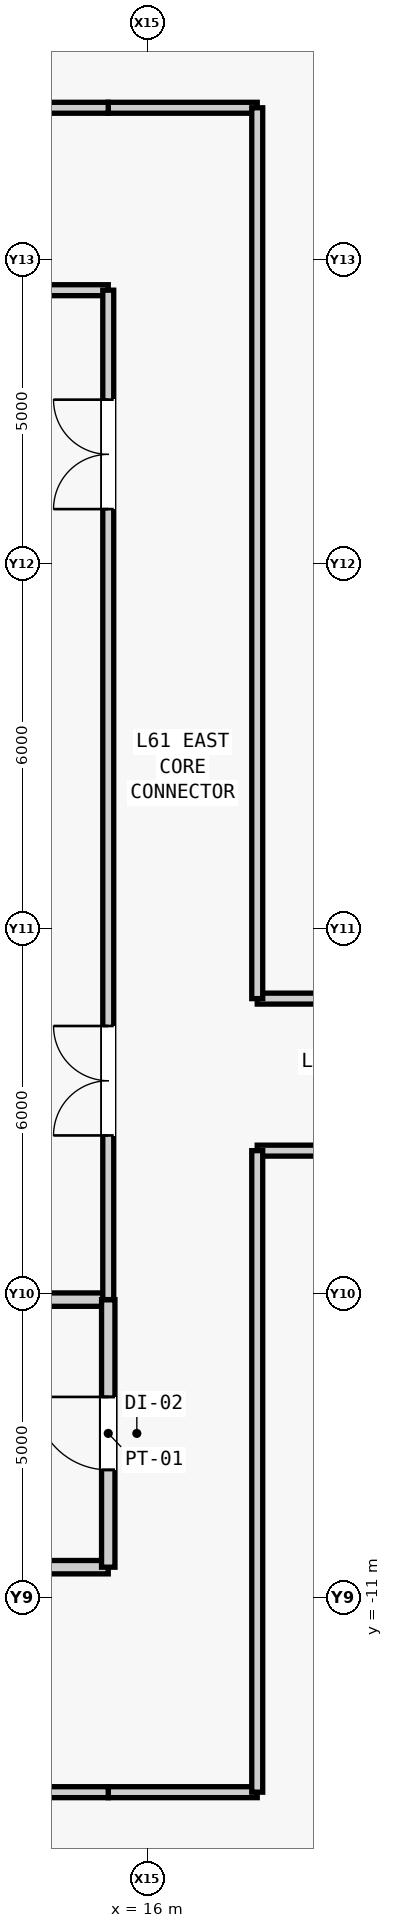
"""IFC4 building model, lengths in metres.
Left out: names, types, materials, properties, quantities, classifications, styles, units other than length and angle.
Written with IfcOpenShell. Run it as: python <this file> out.ifc"""

import sys

from ifc_helpers import new_model, si_unit, direction, frame, frame_2d, origin, place, context, subcontext, project, spatial, rectangle, extrude, source, transform, mapped, element, fill, save


model = new_model("IFC4")
c1 = context("Model", 3, precision=1e-05, world=origin(), true_north=direction((0.0, 1.0)))
c2 = subcontext(c1, "Body", "Model", "MODEL_VIEW")
j1 = project(units=[si_unit("LENGTHUNIT", "METRE"), si_unit("PLANEANGLEUNIT", "RADIAN")], contexts=[c1])
p1 = place(None, origin())
s1 = spatial("IfcSite", under=j1, at=p1, CompositionType="ELEMENT")
p2 = place(p1, origin())
s2 = spatial("IfcBuilding", under=s1, at=p2, CompositionType="ELEMENT")
p3 = place(p2, frame((0.0, 0.0, 259.1)))
s3 = spatial("IfcBuildingStorey", under=s2, at=p3, CompositionType="ELEMENT", Elevation=259.1)
m1 = source(origin(), c2, "Body", "SweptSolid", [
    extrude(rectangle(XDim=4.05, YDim=0.22, at=frame_2d((2.025, 0.0))), origin(), (0.0, 0.0, 1.0), 3.78),
])
p4 = place(p3, frame((11.3, -10.5, 0.0), z_axis=(0.0, 0.0, 1.0), x_axis=(1.0, 0.0, 0.0)))
e1 = element("IfcWall", 1, at=p4, inside=s3, PredefinedType="PARTITIONING", context=c2, shape_type="MappedRepresentation", body=[
    mapped(m1, transform((0.0, 0.0, 0.0), scale=1.0)),
])
m2 = source(origin(), c2, "Body", "SweptSolid", [
    extrude(rectangle(XDim=4.05, YDim=0.22, at=frame_2d((2.025, 0.0))), origin(), (0.0, 0.0, 1.0), 3.085),
])
p5 = place(p3, frame((11.3, -6.1, 0.0), z_axis=(0.0, 0.0, 1.0), x_axis=(1.0, 0.0, 0.0)))
e2 = element("IfcWall", 2, at=p5, inside=s3, PredefinedType="PARTITIONING", context=c2, shape_type="MappedRepresentation", body=[
    mapped(m2, transform((0.0, 0.0, 0.0), scale=1.0)),
])
m3 = source(origin(), c2, "Body", "SweptSolid", [
    extrude(rectangle(XDim=4.4, YDim=0.22, at=frame_2d((2.2, 0.0))), origin(), (0.0, 0.0, 1.0), 3.78),
])
p6 = place(p3, frame((15.35, -10.5, 0.0), z_axis=(0.0, 0.0, 1.0), x_axis=(0.0, 1.0, 0.0)))
e3 = element("IfcWall", 3, at=p6, inside=s3, PredefinedType="PARTITIONING", context=c2, shape_type="MappedRepresentation", body=[
    mapped(m3, transform((0.0, 0.0, 0.0), scale=1.0)),
])
m4 = source(origin(), c2, "Body", "SweptSolid", [
    extrude(rectangle(XDim=1.2, YDim=2.2, at=frame_2d((0.6, 1.1))), frame((0.0, 0.12, 0.0), z_axis=(0.0, -1.0, 0.0), x_axis=(1.0, 0.0, 0.0)), (0.0, 0.0, 1.0), 0.24),
])
p7 = place(p6, frame((1.6, 0.0, 0.0)))
e4 = element("IfcOpeningElement", 4, at=p7, cuts=e3, PredefinedType="OPENING", context=c2, shape_type="MappedRepresentation", body=[
    mapped(m4, transform((0.0, 0.0, 0.0), scale=1.0)),
])
m5 = source(origin(), c2, "Body", "SweptSolid", [
    extrude(rectangle(XDim=4.05, YDim=0.18, at=frame_2d((2.025, 0.0))), origin(), (0.0, 0.0, 1.0), 3.78),
])
p8 = place(p3, frame((11.3, 10.5, 0.0), z_axis=(0.0, 0.0, 1.0), x_axis=(1.0, 0.0, 0.0)))
e5 = element("IfcWall", 5, at=p8, inside=s3, PredefinedType="PARTITIONING", context=c2, shape_type="MappedRepresentation", body=[
    mapped(m5, transform((0.0, 0.0, 0.0), scale=1.0)),
])
m6 = source(origin(), c2, "Body", "SweptSolid", [
    extrude(rectangle(XDim=16.6, YDim=0.18, at=frame_2d((8.3, 0.0))), origin(), (0.0, 0.0, 1.0), 3.78),
])
p9 = place(p3, frame((15.35, -6.1, 0.0), z_axis=(0.0, 0.0, 1.0), x_axis=(0.0, 1.0, 0.0)))
e6 = element("IfcWall", 6, at=p9, inside=s3, PredefinedType="PARTITIONING", context=c2, shape_type="MappedRepresentation", body=[
    mapped(m6, transform((0.0, 0.0, 0.0), scale=1.0)),
])
m7 = source(origin(), c2, "Body", "SweptSolid", [
    extrude(rectangle(XDim=1.8, YDim=2.25, at=frame_2d((0.9, 1.125))), frame((0.0, 0.1, 0.0), z_axis=(0.0, -1.0, 0.0), x_axis=(1.0, 0.0, 0.0)), (0.0, 0.0, 1.0), 0.2),
])
p10 = place(p9, frame((2.7, 0.0, 0.0)))
e7 = element("IfcOpeningElement", 7, at=p10, cuts=e6, PredefinedType="OPENING", context=c2, shape_type="MappedRepresentation", body=[
    mapped(m7, transform((0.0, 0.0, 0.0), scale=1.0)),
])
p11 = place(p9, frame((13.0, 0.0, 0.0)))
e8 = element("IfcOpeningElement", 8, at=p11, cuts=e6, PredefinedType="OPENING", context=c2, shape_type="MappedRepresentation", body=[
    mapped(m7, transform((0.0, 0.0, 0.0), scale=1.0)),
])
m8 = source(origin(), c2, "Body", "SweptSolid", [
    extrude(rectangle(XDim=2.45, YDim=0.18, at=frame_2d((1.225, 0.0))), origin(), (0.0, 0.0, 1.0), 3.78),
])
for number, where, z_axis, x_axis in (
    (9, (15.35, -14.2, 0.0), (0.0, 0.0, 1.0), (1.0, 0.0, 0.0)),
    (10, (15.35, 13.5, 0.0), (0.0, 0.0, 1.0), (1.0, 0.0, 0.0)),
):
    element("IfcWall", number, at=place(p3, frame(where, z_axis=z_axis, x_axis=x_axis)), inside=s3, PredefinedType="PARTITIONING", context=c2, shape_type="MappedRepresentation", body=[
        mapped(m8, transform((0.0, 0.0, 0.0), scale=1.0)),
    ])
m9 = source(origin(), c2, "Body", "SweptSolid", [
    extrude(rectangle(XDim=2.45, YDim=0.18, at=frame_2d((1.225, 0.0))), origin(), (0.0, 0.0, 1.0), 3.78),
])
p12 = place(p3, frame((12.9, -14.2, 0.0), z_axis=(0.0, 0.0, 1.0), x_axis=(1.0, 0.0, 0.0)))
e11 = element("IfcWall", 11, at=p12, inside=s3, PredefinedType="PARTITIONING", context=c2, shape_type="MappedRepresentation", body=[
    mapped(m9, transform((0.0, 0.0, 0.0), scale=1.0)),
])
m10 = source(origin(), c2, "Body", "SweptSolid", [
    extrude(rectangle(XDim=15.05, YDim=0.18, at=frame_2d((7.525, 0.0))), origin(), (0.0, 0.0, 1.0), 3.78),
])
p13 = place(p3, frame((0.3, 13.5, 0.0), z_axis=(0.0, 0.0, 1.0), x_axis=(1.0, 0.0, 0.0)))
e12 = element("IfcWall", 12, at=p13, inside=s3, PredefinedType="PARTITIONING", context=c2, shape_type="MappedRepresentation", body=[
    mapped(m10, transform((0.0, 0.0, 0.0), scale=1.0)),
])
m11 = source(origin(), c2, "Body", "SweptSolid", [
    extrude(rectangle(XDim=12.2, YDim=0.18, at=frame_2d((6.1, 0.0))), origin(), (0.0, 0.0, 1.0), 3.78),
])
p14 = place(p3, frame((17.8, -3.65, 0.0), z_axis=(0.0, 0.0, 1.0), x_axis=(1.0, 0.0, 0.0)))
e13 = element("IfcWall", 13, at=p14, inside=s3, PredefinedType="PARTITIONING", context=c2, shape_type="MappedRepresentation", body=[
    mapped(m11, transform((0.0, 0.0, 0.0), scale=1.0)),
])
m12 = source(origin(), c2, "Body", "SweptSolid", [
    extrude(rectangle(XDim=0.95, YDim=2.15, at=frame_2d((0.475, 1.075))), frame((0.0, 0.1, 0.0), z_axis=(0.0, -1.0, 0.0), x_axis=(1.0, 0.0, 0.0)), (0.0, 0.0, 1.0), 0.2),
])
p15 = place(p14, frame((5.625, 0.0, 0.0)))
e14 = element("IfcOpeningElement", 14, at=p15, cuts=e13, PredefinedType="OPENING", context=c2, shape_type="MappedRepresentation", body=[
    mapped(m12, transform((0.0, 0.0, 0.0), scale=1.0)),
])
m13 = source(origin(), c2, "Body", "SweptSolid", [
    extrude(rectangle(XDim=10.55, YDim=0.18, at=frame_2d((5.275, 0.0))), origin(), (0.0, 0.0, 1.0), 3.78),
])
p16 = place(p3, frame((17.8, -14.2, 0.0), z_axis=(0.0, 0.0, 1.0), x_axis=(0.0, 1.0, 0.0)))
e15 = element("IfcWall", 15, at=p16, inside=s3, PredefinedType="PARTITIONING", context=c2, shape_type="MappedRepresentation", body=[
    mapped(m13, transform((0.0, 0.0, 0.0), scale=1.0)),
])
p17 = place(p3, frame((17.8, -1.15, 0.0), z_axis=(0.0, 0.0, 1.0), x_axis=(1.0, 0.0, 0.0)))
e16 = element("IfcWall", 16, at=p17, inside=s3, PredefinedType="PARTITIONING", context=c2, shape_type="MappedRepresentation", body=[
    mapped(m11, transform((0.0, 0.0, 0.0), scale=1.0)),
])
p18 = place(p17, frame((5.625, 0.0, 0.0)))
e17 = element("IfcOpeningElement", 17, at=p18, cuts=e16, PredefinedType="OPENING", context=c2, shape_type="MappedRepresentation", body=[
    mapped(m12, transform((0.0, 0.0, 0.0), scale=1.0)),
])
m14 = source(origin(), c2, "Body", "SweptSolid", [
    extrude(rectangle(XDim=14.65, YDim=0.18, at=frame_2d((7.325, 0.0))), origin(), (0.0, 0.0, 1.0), 3.78),
])
p19 = place(p3, frame((17.8, -1.15, 0.0), z_axis=(0.0, 0.0, 1.0), x_axis=(0.0, 1.0, 0.0)))
e18 = element("IfcWall", 18, at=p19, inside=s3, PredefinedType="PARTITIONING", context=c2, shape_type="MappedRepresentation", body=[
    mapped(m14, transform((0.0, 0.0, 0.0), scale=1.0)),
])
m15 = source(origin(), c2, "Body", "SweptSolid", [
    extrude(rectangle(XDim=1.2, YDim=2.2, at=frame_2d((0.6, 1.1))), frame((0.0, 0.025, 0.0), z_axis=(0.0, -1.0, 0.0), x_axis=(1.0, 0.0, 0.0)), (0.0, 0.0, 1.0), 0.05),
])
p20 = place(p7, origin())
e19 = element("IfcDoor", 19, at=p20, inside=s3, OperationType="SINGLE_SWING_RIGHT", PredefinedType="DOOR", context=c2, shape_type="MappedRepresentation", body=[
    mapped(m15, transform((0.0, 0.0, 0.0), scale=1.0)),
])
fill(e4, e19)
m16 = source(origin(), c2, "Body", "SweptSolid", [
    extrude(rectangle(XDim=1.8, YDim=2.25, at=frame_2d((0.9, 1.125))), frame((0.0, 0.025, 0.0), z_axis=(0.0, -1.0, 0.0), x_axis=(1.0, 0.0, 0.0)), (0.0, 0.0, 1.0), 0.05),
])
p21 = place(p10, origin())
e20 = element("IfcDoor", 20, at=p21, inside=s3, OperationType="SINGLE_SWING_RIGHT", PredefinedType="DOOR", context=c2, shape_type="MappedRepresentation", body=[
    mapped(m16, transform((0.0, 0.0, 0.0), scale=1.0)),
])
fill(e7, e20)
p22 = place(p11, origin())
e21 = element("IfcDoor", 21, at=p22, inside=s3, OperationType="SINGLE_SWING_LEFT", PredefinedType="DOOR", context=c2, shape_type="MappedRepresentation", body=[
    mapped(m16, transform((0.0, 0.0, 0.0), scale=1.0)),
])
fill(e8, e21)
save(model, sys.argv[1])
